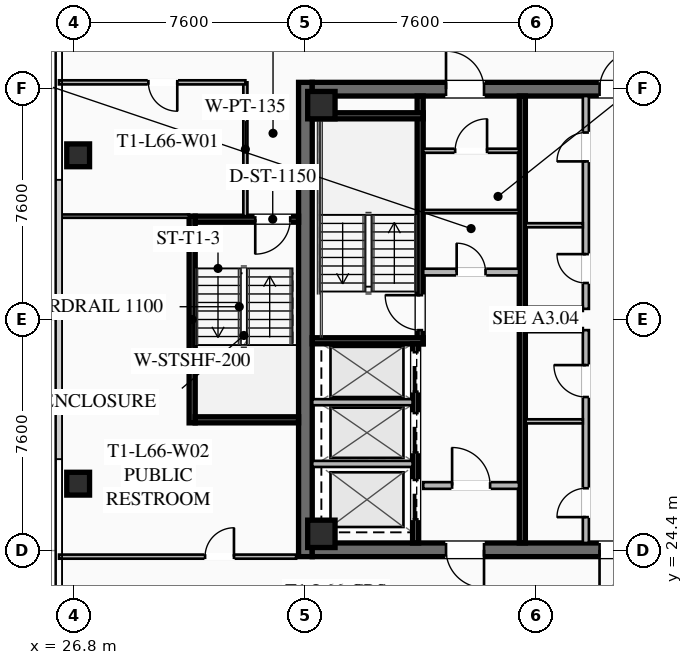
"""IFC4 building model, lengths in metres.
Left out: names, types, materials, properties, quantities, classifications, styles, units other than length and angle.
Written with IfcOpenShell. Run it as: python <this file> out.ifc"""

import sys

from ifc_helpers import new_model, si_unit, direction, frame, frame_2d, origin, origin_2d, place, context, subcontext, project, spatial, rectangle, hollow_rectangle, extrude, element, fill, save


model = new_model("IFC4")
c1 = context("Model", 3, precision=1e-05, world=origin(), true_north=direction((0.0, 1.0)))
c2 = subcontext(c1, "Body", "Model", "MODEL_VIEW")
j1 = project(units=[si_unit("LENGTHUNIT", "METRE"), si_unit("PLANEANGLEUNIT", "RADIAN")], contexts=[c1])
p1 = place(None, origin())
s1 = spatial("IfcSite", under=j1, at=p1, CompositionType="ELEMENT")
p2 = place(p1, origin())
s2 = spatial("IfcBuilding", under=s1, at=p2, CompositionType="ELEMENT")
p3 = place(p2, frame((0.0, 0.0, 243.25)))
s3 = spatial("IfcBuildingStorey", under=s2, at=p3, CompositionType="ELEMENT", Elevation=243.25)
p4 = place(p3, frame((34.425, 24.2, 0.0), z_axis=(0.0, 0.0, 1.0), x_axis=(0.0, 1.0, 0.0)))
e1 = element("IfcWall", 1, at=p4, inside=s3, PredefinedType="SHEAR", context=c2, shape_type="SweptSolid", body=[
    extrude(rectangle(XDim=15.6, YDim=0.45, at=frame_2d((7.8, 0.0))), origin(), (0.0, 0.0, 1.0), 3.55),
])
p5 = place(p3, frame((49.35, 24.425, 0.0), z_axis=(0.0, 0.0, 1.0), x_axis=(-1.0, 0.0, 0.0)))
e2 = element("IfcWall", 2, at=p5, inside=s3, PredefinedType="SHEAR", context=c2, shape_type="SweptSolid", body=[
    extrude(rectangle(XDim=14.7, YDim=0.45, at=frame_2d((7.35, 0.0))), origin(), (0.0, 0.0, 1.0), 3.55),
])
p6 = place(p5, frame((9.05, 0.0, 0.0)))
e3 = element("IfcOpeningElement", 3, at=p6, cuts=e2, PredefinedType="OPENING", context=c2, shape_type="SweptSolid", body=[
    extrude(rectangle(XDim=1.25, YDim=2.25, at=frame_2d((0.625, 1.125))), frame((0.0, 0.235, 0.0), z_axis=(0.0, -1.0, 0.0), x_axis=(1.0, 0.0, 0.0)), (0.0, 0.0, 1.0), 0.47),
])
p7 = place(p5, frame((4.0, 0.0, 0.0)))
e4 = element("IfcOpeningElement", 4, at=p7, cuts=e2, PredefinedType="OPENING", context=c2, shape_type="SweptSolid", body=[
    extrude(rectangle(XDim=1.25, YDim=2.25, at=frame_2d((0.625, 1.125))), frame((0.0, 0.235, 0.0), z_axis=(0.0, -1.0, 0.0), x_axis=(1.0, 0.0, 0.0)), (0.0, 0.0, 1.0), 0.47),
])
p8 = place(p3, frame((34.65, 39.575, 0.0), z_axis=(0.0, 0.0, 1.0), x_axis=(1.0, 0.0, 0.0)))
e5 = element("IfcWall", 5, at=p8, inside=s3, PredefinedType="SHEAR", context=c2, shape_type="SweptSolid", body=[
    extrude(rectangle(XDim=14.7, YDim=0.45, at=frame_2d((7.35, 0.0))), origin(), (0.0, 0.0, 1.0), 3.55),
])
p9 = place(p8, frame((4.4, 0.0, 0.0)))
e6 = element("IfcOpeningElement", 6, at=p9, cuts=e5, PredefinedType="OPENING", context=c2, shape_type="SweptSolid", body=[
    extrude(rectangle(XDim=1.25, YDim=2.25, at=frame_2d((0.625, 1.125))), frame((0.0, 0.235, 0.0), z_axis=(0.0, -1.0, 0.0), x_axis=(1.0, 0.0, 0.0)), (0.0, 0.0, 1.0), 0.47),
])
p10 = place(p8, frame((9.45, 0.0, 0.0)))
e7 = element("IfcOpeningElement", 7, at=p10, cuts=e5, PredefinedType="OPENING", context=c2, shape_type="SweptSolid", body=[
    extrude(rectangle(XDim=1.25, YDim=2.25, at=frame_2d((0.625, 1.125))), frame((0.0, 0.235, 0.0), z_axis=(0.0, -1.0, 0.0), x_axis=(1.0, 0.0, 0.0)), (0.0, 0.0, 1.0), 0.47),
])
for number, where, z_axis, x_axis in (
    (8, (34.95, 24.95, 0.0), (0.0, 0.0, 1.0), (1.0, 0.0, 0.0)),
    (9, (34.95, 39.05, 0.0), (0.0, 0.0, 1.0), (1.0, 0.0, 0.0)),
):
    element("IfcColumn", number, at=place(p3, frame(where, z_axis=z_axis, x_axis=x_axis)), inside=s3, PredefinedType="COLUMN", context=c2, shape_type="SweptSolid", body=[
        extrude(hollow_rectangle(XDim=0.9, YDim=0.9, WallThickness=0.04, at=origin_2d()), origin(), (0.0, 0.0, 1.0), 3.25),
    ])
for number, where, z_axis, x_axis in (
    (10, (26.95, 37.4, 0.0), (0.0, 0.0, 1.0), (1.0, 0.0, 0.0)),
    (11, (26.95, 26.6, 0.0), (0.0, 0.0, 1.0), (1.0, 0.0, 0.0)),
):
    element("IfcColumn", number, at=place(p3, frame(where, z_axis=z_axis, x_axis=x_axis)), inside=s3, PredefinedType="COLUMN", context=c2, shape_type="SweptSolid", body=[
        extrude(hollow_rectangle(XDim=0.75, YDim=0.75, WallThickness=0.032, at=origin_2d()), origin(), (0.0, 0.0, 1.0), 3.25),
    ])
p11 = place(p3, frame((38.2, 31.2, 0.0), z_axis=(0.0, 0.0, 1.0), x_axis=(0.0, 1.0, 0.0)))
e12 = element("IfcWall", 12, at=p11, inside=s3, PredefinedType="SHEAR", context=c2, shape_type="SweptSolid", body=[
    extrude(rectangle(XDim=8.15, YDim=0.2, at=frame_2d((4.075, 0.0))), origin(), (0.0, 0.0, 1.0), 3.25),
])
p12 = place(p11, frame((0.45, 0.0, 0.0)))
e13 = element("IfcOpeningElement", 13, at=p12, cuts=e12, PredefinedType="OPENING", context=c2, shape_type="SweptSolid", body=[
    extrude(rectangle(XDim=1.15, YDim=2.2, at=frame_2d((0.575, 1.1))), frame((0.0, 0.11, 0.0), z_axis=(0.0, -1.0, 0.0), x_axis=(1.0, 0.0, 0.0)), (0.0, 0.0, 1.0), 0.22),
])
for number, where, z_axis, x_axis in (
    (14, (34.65, 31.3, 0.0), (0.0, 0.0, 1.0), (1.0, 0.0, 0.0)),
    (15, (34.65, 38.7, 0.0), (0.0, 0.0, 1.0), (1.0, 0.0, 0.0)),
):
    element("IfcWall", number, at=place(p3, frame(where, z_axis=z_axis, x_axis=x_axis)), inside=s3, PredefinedType="SHEAR", context=c2, shape_type="SweptSolid", body=[
        extrude(rectangle(XDim=3.65, YDim=0.2, at=frame_2d((1.825, 0.0))), origin(), (0.0, 0.0, 1.0), 3.25),
    ])
p13 = place(p3, frame((41.56, 24.65, 0.0), z_axis=(0.0, 0.0, 1.0), x_axis=(0.0, 1.0, 0.0)))
e16 = element("IfcWall", 16, at=p13, inside=s3, PredefinedType="SHEAR", context=c2, shape_type="SweptSolid", body=[
    extrude(rectangle(XDim=14.7, YDim=0.2, at=frame_2d((7.35, 0.0))), origin(), (0.0, 0.0, 1.0), 3.25),
])
p14 = place(p3, frame((38.3, 33.56, 0.0), z_axis=(0.0, 0.0, 1.0), x_axis=(1.0, 0.0, 0.0)))
e17 = element("IfcWall", 17, at=p14, inside=s3, PredefinedType="SOLIDWALL", context=c2, shape_type="SweptSolid", body=[
    extrude(rectangle(XDim=3.15, YDim=0.22, at=frame_2d((1.575, 0.0))), origin(), (0.0, 0.0, 1.0), 2.393),
])
p15 = place(p14, frame((1.1, 0.0, 0.0)))
e18 = element("IfcOpeningElement", 18, at=p15, cuts=e17, PredefinedType="OPENING", context=c2, shape_type="SweptSolid", body=[
    extrude(rectangle(XDim=0.95, YDim=2.05, at=frame_2d((0.475, 1.025))), frame((0.0, 0.12, 0.0), z_axis=(0.0, -1.0, 0.0), x_axis=(1.0, 0.0, 0.0)), (0.0, 0.0, 1.0), 0.24),
])
p16 = place(p3, frame((38.3, 26.54, 0.0), z_axis=(0.0, 0.0, 1.0), x_axis=(1.0, 0.0, 0.0)))
e19 = element("IfcWall", 19, at=p16, inside=s3, PredefinedType="SOLIDWALL", context=c2, shape_type="SweptSolid", body=[
    extrude(rectangle(XDim=3.15, YDim=0.22, at=frame_2d((1.575, 0.0))), origin(), (0.0, 0.0, 1.0), 2.393),
])
p17 = place(p16, frame((0.95, 0.0, 0.0)))
e20 = element("IfcOpeningElement", 20, at=p17, cuts=e19, PredefinedType="OPENING", context=c2, shape_type="SweptSolid", body=[
    extrude(rectangle(XDim=1.25, YDim=2.25, at=frame_2d((0.625, 1.125))), frame((0.0, 0.12, 0.0), z_axis=(0.0, -1.0, 0.0), x_axis=(1.0, 0.0, 0.0)), (0.0, 0.0, 1.0), 0.24),
])
p18 = place(p3, frame((38.05, 24.65, 0.0), z_axis=(0.0, 0.0, 1.0), x_axis=(0.0, 1.0, 0.0)))
e21 = element("IfcWall", 21, at=p18, inside=s3, PredefinedType="SHEAR", context=c2, shape_type="SweptSolid", body=[
    extrude(rectangle(XDim=6.55, YDim=0.2, at=frame_2d((3.275, 0.0))), origin(), (0.0, 0.0, 1.0), 3.25),
])
p19 = place(p18, frame((4.975, 0.0, 0.0)))
e22 = element("IfcOpeningElement", 22, at=p19, cuts=e21, PredefinedType="OPENING", context=c2, shape_type="SweptSolid", body=[
    extrude(rectangle(XDim=1.3, YDim=2.25, at=frame_2d((0.65, 1.125))), frame((0.0, 0.11, 0.0), z_axis=(0.0, -1.0, 0.0), x_axis=(1.0, 0.0, 0.0)), (0.0, 0.0, 1.0), 0.22),
])
p20 = place(p18, frame((2.975, 0.0, 0.0)))
e23 = element("IfcOpeningElement", 23, at=p20, cuts=e21, PredefinedType="OPENING", context=c2, shape_type="SweptSolid", body=[
    extrude(rectangle(XDim=1.3, YDim=2.25, at=frame_2d((0.65, 1.125))), frame((0.0, 0.11, 0.0), z_axis=(0.0, -1.0, 0.0), x_axis=(1.0, 0.0, 0.0)), (0.0, 0.0, 1.0), 0.22),
])
p21 = place(p18, frame((0.775, 0.0, 0.0)))
e24 = element("IfcOpeningElement", 24, at=p21, cuts=e21, PredefinedType="OPENING", context=c2, shape_type="SweptSolid", body=[
    extrude(rectangle(XDim=1.3, YDim=2.25, at=frame_2d((0.65, 1.125))), frame((0.0, 0.11, 0.0), z_axis=(0.0, -1.0, 0.0), x_axis=(1.0, 0.0, 0.0)), (0.0, 0.0, 1.0), 0.22),
])
for number, where, z_axis, x_axis in (
    (25, (34.65, 27.25, 0.0), (0.0, 0.0, 1.0), (1.0, 0.0, 0.0)),
    (26, (34.65, 29.28, 0.0), (0.0, 0.0, 1.0), (1.0, 0.0, 0.0)),
):
    element("IfcWall", number, at=place(p3, frame(where, z_axis=z_axis, x_axis=x_axis)), inside=s3, PredefinedType="SOLIDWALL", context=c2, shape_type="SweptSolid", body=[
        extrude(rectangle(XDim=3.3, YDim=0.2, at=frame_2d((1.65, 0.0))), origin(), (0.0, 0.0, 1.0), 3.25),
    ])
p22 = place(p3, frame((38.3, 37.55, 0.0), z_axis=(0.0, 0.0, 1.0), x_axis=(1.0, 0.0, 0.0)))
e27 = element("IfcWall", 27, at=p22, inside=s3, PredefinedType="PARTITIONING", context=c2, shape_type="SweptSolid", body=[
    extrude(rectangle(XDim=3.15, YDim=0.135, at=frame_2d((1.575, 0.0))), origin(), (0.0, 0.0, 1.0), 2.393),
])
p23 = place(p22, frame((1.05, 0.0, 0.0)))
e28 = element("IfcOpeningElement", 28, at=p23, cuts=e27, PredefinedType="OPENING", context=c2, shape_type="SweptSolid", body=[
    extrude(rectangle(XDim=1.05, YDim=2.2, at=frame_2d((0.525, 1.1))), frame((0.0, 0.077, 0.0), z_axis=(0.0, -1.0, 0.0), x_axis=(1.0, 0.0, 0.0)), (0.0, 0.0, 1.0), 0.155),
])
p24 = place(p3, frame((38.3, 35.55, 0.0), z_axis=(0.0, 0.0, 1.0), x_axis=(1.0, 0.0, 0.0)))
e29 = element("IfcWall", 29, at=p24, inside=s3, PredefinedType="PARTITIONING", context=c2, shape_type="SweptSolid", body=[
    extrude(rectangle(XDim=3.15, YDim=0.11, at=frame_2d((1.575, 0.0))), origin(), (0.0, 0.0, 1.0), 2.393),
])
p25 = place(p3, frame((43.65, 24.65, 0.0), z_axis=(0.0, 0.0, 1.0), x_axis=(0.0, 1.0, 0.0)))
e30 = element("IfcWall", 30, at=p25, inside=s3, PredefinedType="SOLIDWALL", context=c2, shape_type="SweptSolid", body=[
    extrude(rectangle(XDim=7.0, YDim=0.2, at=frame_2d((3.5, 0.0))), origin(), (0.0, 0.0, 1.0), 2.393),
])
p26 = place(p25, frame((0.85, 0.0, 0.0)))
e31 = element("IfcOpeningElement", 31, at=p26, cuts=e30, PredefinedType="OPENING", context=c2, shape_type="SweptSolid", body=[
    extrude(rectangle(XDim=0.95, YDim=2.05, at=frame_2d((0.475, 1.025))), frame((0.0, 0.11, 0.0), z_axis=(0.0, -1.0, 0.0), x_axis=(1.0, 0.0, 0.0)), (0.0, 0.0, 1.0), 0.22),
])
p27 = place(p25, frame((4.8, 0.0, 0.0)))
e32 = element("IfcOpeningElement", 32, at=p27, cuts=e30, PredefinedType="OPENING", context=c2, shape_type="SweptSolid", body=[
    extrude(rectangle(XDim=1.05, YDim=2.2, at=frame_2d((0.525, 1.1))), frame((0.0, 0.11, 0.0), z_axis=(0.0, -1.0, 0.0), x_axis=(1.0, 0.0, 0.0)), (0.0, 0.0, 1.0), 0.22),
])
for number, where, z_axis, x_axis in (
    (33, (41.67, 31.65, 0.0), (0.0, 0.0, 1.0), (1.0, 0.0, 0.0)),
    (34, (41.67, 28.65, 0.0), (0.0, 0.0, 1.0), (1.0, 0.0, 0.0)),
):
    element("IfcWall", number, at=place(p3, frame(where, z_axis=z_axis, x_axis=x_axis)), inside=s3, PredefinedType="PARTITIONING", context=c2, shape_type="SweptSolid", body=[
        extrude(rectangle(XDim=1.88, YDim=0.135, at=frame_2d((0.94, 0.0))), origin(), (0.0, 0.0, 1.0), 2.393),
    ])
p28 = place(p3, frame((43.65, 32.35, 0.0), z_axis=(0.0, 0.0, 1.0), x_axis=(0.0, 1.0, 0.0)))
e35 = element("IfcWall", 35, at=p28, inside=s3, PredefinedType="SOLIDWALL", context=c2, shape_type="SweptSolid", body=[
    extrude(rectangle(XDim=7.0, YDim=0.2, at=frame_2d((3.5, 0.0))), origin(), (0.0, 0.0, 1.0), 2.393),
])
p29 = place(p28, frame((0.85, 0.0, 0.0)))
e36 = element("IfcOpeningElement", 36, at=p29, cuts=e35, PredefinedType="OPENING", context=c2, shape_type="SweptSolid", body=[
    extrude(rectangle(XDim=0.95, YDim=2.05, at=frame_2d((0.475, 1.025))), frame((0.0, 0.11, 0.0), z_axis=(0.0, -1.0, 0.0), x_axis=(1.0, 0.0, 0.0)), (0.0, 0.0, 1.0), 0.22),
])
p30 = place(p28, frame((4.85, 0.0, 0.0)))
e37 = element("IfcOpeningElement", 37, at=p30, cuts=e35, PredefinedType="OPENING", context=c2, shape_type="SweptSolid", body=[
    extrude(rectangle(XDim=0.95, YDim=2.05, at=frame_2d((0.475, 1.025))), frame((0.0, 0.11, 0.0), z_axis=(0.0, -1.0, 0.0), x_axis=(1.0, 0.0, 0.0)), (0.0, 0.0, 1.0), 0.22),
])
for number, where, z_axis, x_axis in (
    (38, (41.67, 32.35, 0.0), (0.0, 0.0, 1.0), (1.0, 0.0, 0.0)),
    (39, (41.67, 35.1, 0.0), (0.0, 0.0, 1.0), (1.0, 0.0, 0.0)),
):
    element("IfcWall", number, at=place(p3, frame(where, z_axis=z_axis, x_axis=x_axis)), inside=s3, PredefinedType="PARTITIONING", context=c2, shape_type="SweptSolid", body=[
        extrude(rectangle(XDim=1.88, YDim=0.135, at=frame_2d((0.94, 0.0))), origin(), (0.0, 0.0, 1.0), 2.393),
    ])
p31 = place(p3, frame((30.7, 28.6, 0.0), z_axis=(0.0, 0.0, 1.0), x_axis=(0.0, 1.0, 0.0)))
e40 = element("IfcWall", 40, at=p31, inside=s3, PredefinedType="SHEAR", context=c2, shape_type="SweptSolid", body=[
    extrude(rectangle(XDim=6.8, YDim=0.2, at=frame_2d((3.4, 0.0))), origin(), (0.0, 0.0, 1.0), 3.25),
])
p32 = place(p3, frame((34.2, 35.3, 0.0), z_axis=(0.0, 0.0, 1.0), x_axis=(-1.0, 0.0, 0.0)))
e41 = element("IfcWall", 41, at=p32, inside=s3, PredefinedType="SHEAR", context=c2, shape_type="SweptSolid", body=[
    extrude(rectangle(XDim=3.4, YDim=0.2, at=frame_2d((1.7, 0.0))), origin(), (0.0, 0.0, 1.0), 3.25),
])
p33 = place(p32, frame((0.275, 0.0, 0.0)))
e42 = element("IfcOpeningElement", 42, at=p33, cuts=e41, PredefinedType="OPENING", context=c2, shape_type="SweptSolid", body=[
    extrude(rectangle(XDim=1.15, YDim=2.2, at=frame_2d((0.575, 1.1))), frame((0.0, 0.11, 0.0), z_axis=(0.0, -1.0, 0.0), x_axis=(1.0, 0.0, 0.0)), (0.0, 0.0, 1.0), 0.22),
])
p34 = place(p3, frame((30.8, 28.7, 0.0), z_axis=(0.0, 0.0, 1.0), x_axis=(1.0, 0.0, 0.0)))
e43 = element("IfcWall", 43, at=p34, inside=s3, PredefinedType="SHEAR", context=c2, shape_type="SweptSolid", body=[
    extrude(rectangle(XDim=3.4, YDim=0.2, at=frame_2d((1.7, 0.0))), origin(), (0.0, 0.0, 1.0), 3.25),
])
p35 = place(p3, frame((32.45, 35.4, 0.0), z_axis=(0.0, 0.0, 1.0), x_axis=(0.0, 1.0, 0.0)))
e44 = element("IfcWall", 44, at=p35, inside=s3, PredefinedType="PARTITIONING", context=c2, shape_type="SweptSolid", body=[
    extrude(rectangle(XDim=4.4, YDim=0.135, at=frame_2d((2.2, 0.0))), origin(), (0.0, 0.0, 1.0), 2.393),
])
p36 = place(p3, frame((32.45, 39.8, 0.0), z_axis=(0.0, 0.0, 1.0), x_axis=(-1.0, 0.0, 0.0)))
e45 = element("IfcWall", 45, at=p36, inside=s3, PredefinedType="PARTITIONING", context=c2, shape_type="SweptSolid", body=[
    extrude(rectangle(XDim=6.13, YDim=0.135, at=frame_2d((3.065, 0.0))), origin(), (0.0, 0.0, 1.0), 2.393),
])
p37 = place(p36, frame((2.24, 0.0, 0.0)))
e46 = element("IfcOpeningElement", 46, at=p37, cuts=e45, PredefinedType="OPENING", context=c2, shape_type="SweptSolid", body=[
    extrude(rectangle(XDim=0.95, YDim=2.05, at=frame_2d((0.475, 1.025))), frame((0.0, 0.077, 0.0), z_axis=(0.0, -1.0, 0.0), x_axis=(1.0, 0.0, 0.0)), (0.0, 0.0, 1.0), 0.155),
])
p38 = place(p3, frame((26.32, 24.2, 0.0), z_axis=(0.0, 0.0, 1.0), x_axis=(1.0, 0.0, 0.0)))
e47 = element("IfcWall", 47, at=p38, inside=s3, PredefinedType="PARTITIONING", context=c2, shape_type="SweptSolid", body=[
    extrude(rectangle(XDim=7.8, YDim=0.135, at=frame_2d((3.9, 0.0))), origin(), (0.0, 0.0, 1.0), 2.393),
])
p39 = place(p38, frame((4.805, 0.0, 0.0)))
e48 = element("IfcOpeningElement", 48, at=p39, cuts=e47, PredefinedType="OPENING", context=c2, shape_type="SweptSolid", body=[
    extrude(rectangle(XDim=0.95, YDim=2.05, at=frame_2d((0.475, 1.025))), frame((0.0, 0.077, 0.0), z_axis=(0.0, -1.0, 0.0), x_axis=(1.0, 0.0, 0.0)), (0.0, 0.0, 1.0), 0.155),
])
p40 = place(p3, frame((30.6, 35.4, 0.0), z_axis=(0.0, 0.0, 1.0), x_axis=(-1.0, 0.0, 0.0)))
e49 = element("IfcWall", 49, at=p40, inside=s3, PredefinedType="PARTITIONING", context=c2, shape_type="SweptSolid", body=[
    extrude(rectangle(XDim=4.28, YDim=0.11, at=frame_2d((2.14, 0.0))), origin(), (0.0, 0.0, 1.0), 2.393),
])
p41 = place(p9, origin())
e50 = element("IfcDoor", 50, at=p41, inside=s3, OperationType="SINGLE_SWING_LEFT", PredefinedType="DOOR", context=c2, shape_type="SweptSolid", body=[
    extrude(rectangle(XDim=1.25, YDim=2.25, at=frame_2d((0.625, 1.125))), frame((0.0, 0.025, 0.0), z_axis=(0.0, -1.0, 0.0), x_axis=(1.0, 0.0, 0.0)), (0.0, 0.0, 1.0), 0.05),
])
fill(e6, e50)
p42 = place(p10, origin())
e51 = element("IfcDoor", 51, at=p42, inside=s3, OperationType="SINGLE_SWING_RIGHT", PredefinedType="DOOR", context=c2, shape_type="SweptSolid", body=[
    extrude(rectangle(XDim=1.25, YDim=2.25, at=frame_2d((0.625, 1.125))), frame((0.0, 0.025, 0.0), z_axis=(0.0, -1.0, 0.0), x_axis=(1.0, 0.0, 0.0)), (0.0, 0.0, 1.0), 0.05),
])
fill(e7, e51)
p43 = place(p6, origin())
e52 = element("IfcDoor", 52, at=p43, inside=s3, OperationType="SINGLE_SWING_LEFT", PredefinedType="DOOR", context=c2, shape_type="SweptSolid", body=[
    extrude(rectangle(XDim=1.25, YDim=2.25, at=frame_2d((0.625, 1.125))), frame((0.0, 0.025, 0.0), z_axis=(0.0, -1.0, 0.0), x_axis=(1.0, 0.0, 0.0)), (0.0, 0.0, 1.0), 0.05),
])
fill(e3, e52)
p44 = place(p7, origin())
e53 = element("IfcDoor", 53, at=p44, inside=s3, OperationType="SINGLE_SWING_RIGHT", PredefinedType="DOOR", context=c2, shape_type="SweptSolid", body=[
    extrude(rectangle(XDim=1.25, YDim=2.25, at=frame_2d((0.625, 1.125))), frame((0.0, 0.025, 0.0), z_axis=(0.0, -1.0, 0.0), x_axis=(1.0, 0.0, 0.0)), (0.0, 0.0, 1.0), 0.05),
])
fill(e4, e53)
p45 = place(p12, origin())
e54 = element("IfcDoor", 54, at=p45, inside=s3, OperationType="SINGLE_SWING_RIGHT", PredefinedType="DOOR", context=c2, shape_type="SweptSolid", body=[
    extrude(rectangle(XDim=1.15, YDim=2.2, at=frame_2d((0.575, 1.1))), frame((0.0, 0.025, 0.0), z_axis=(0.0, -1.0, 0.0), x_axis=(1.0, 0.0, 0.0)), (0.0, 0.0, 1.0), 0.05),
])
fill(e13, e54)
p46 = place(p17, origin())
e55 = element("IfcDoor", 55, at=p46, inside=s3, OperationType="SINGLE_SWING_LEFT", PredefinedType="DOOR", context=c2, shape_type="SweptSolid", body=[
    extrude(rectangle(XDim=1.25, YDim=2.25, at=frame_2d((0.625, 1.125))), frame((0.0, 0.025, 0.0), z_axis=(0.0, -1.0, 0.0), x_axis=(1.0, 0.0, 0.0)), (0.0, 0.0, 1.0), 0.05),
])
fill(e20, e55)
p47 = place(p23, origin())
e56 = element("IfcDoor", 56, at=p47, inside=s3, OperationType="SINGLE_SWING_RIGHT", PredefinedType="DOOR", context=c2, shape_type="SweptSolid", body=[
    extrude(rectangle(XDim=1.05, YDim=2.2, at=frame_2d((0.525, 1.1))), frame((0.0, 0.025, 0.0), z_axis=(0.0, -1.0, 0.0), x_axis=(1.0, 0.0, 0.0)), (0.0, 0.0, 1.0), 0.05),
])
fill(e28, e56)
p48 = place(p15, origin())
e57 = element("IfcDoor", 57, at=p48, inside=s3, OperationType="SINGLE_SWING_LEFT", PredefinedType="DOOR", context=c2, shape_type="SweptSolid", body=[
    extrude(rectangle(XDim=0.95, YDim=2.05, at=frame_2d((0.475, 1.025))), frame((0.0, 0.025, 0.0), z_axis=(0.0, -1.0, 0.0), x_axis=(1.0, 0.0, 0.0)), (0.0, 0.0, 1.0), 0.05),
])
fill(e18, e57)
p49 = place(p26, origin())
e58 = element("IfcDoor", 58, at=p49, inside=s3, OperationType="SINGLE_SWING_LEFT", PredefinedType="DOOR", context=c2, shape_type="SweptSolid", body=[
    extrude(rectangle(XDim=0.95, YDim=2.05, at=frame_2d((0.475, 1.025))), frame((0.0, 0.025, 0.0), z_axis=(0.0, -1.0, 0.0), x_axis=(1.0, 0.0, 0.0)), (0.0, 0.0, 1.0), 0.05),
])
fill(e31, e58)
p50 = place(p27, origin())
e59 = element("IfcDoor", 59, at=p50, inside=s3, OperationType="SINGLE_SWING_RIGHT", PredefinedType="DOOR", context=c2, shape_type="SweptSolid", body=[
    extrude(rectangle(XDim=1.05, YDim=2.2, at=frame_2d((0.525, 1.1))), frame((0.0, 0.025, 0.0), z_axis=(0.0, -1.0, 0.0), x_axis=(1.0, 0.0, 0.0)), (0.0, 0.0, 1.0), 0.05),
])
fill(e32, e59)
p51 = place(p29, origin())
e60 = element("IfcDoor", 60, at=p51, inside=s3, OperationType="SINGLE_SWING_RIGHT", PredefinedType="DOOR", context=c2, shape_type="SweptSolid", body=[
    extrude(rectangle(XDim=0.95, YDim=2.05, at=frame_2d((0.475, 1.025))), frame((0.0, 0.025, 0.0), z_axis=(0.0, -1.0, 0.0), x_axis=(1.0, 0.0, 0.0)), (0.0, 0.0, 1.0), 0.05),
])
fill(e36, e60)
p52 = place(p30, origin())
e61 = element("IfcDoor", 61, at=p52, inside=s3, OperationType="SINGLE_SWING_LEFT", PredefinedType="DOOR", context=c2, shape_type="SweptSolid", body=[
    extrude(rectangle(XDim=0.95, YDim=2.05, at=frame_2d((0.475, 1.025))), frame((0.0, 0.025, 0.0), z_axis=(0.0, -1.0, 0.0), x_axis=(1.0, 0.0, 0.0)), (0.0, 0.0, 1.0), 0.05),
])
fill(e37, e61)
p53 = place(p33, origin())
e62 = element("IfcDoor", 62, at=p53, inside=s3, OperationType="SINGLE_SWING_RIGHT", PredefinedType="DOOR", context=c2, shape_type="SweptSolid", body=[
    extrude(rectangle(XDim=1.15, YDim=2.2, at=frame_2d((0.575, 1.1))), frame((0.0, 0.025, 0.0), z_axis=(0.0, -1.0, 0.0), x_axis=(1.0, 0.0, 0.0)), (0.0, 0.0, 1.0), 0.05),
])
fill(e42, e62)
p54 = place(p37, origin())
e63 = element("IfcDoor", 63, at=p54, inside=s3, OperationType="SINGLE_SWING_LEFT", PredefinedType="DOOR", context=c2, shape_type="SweptSolid", body=[
    extrude(rectangle(XDim=0.95, YDim=2.05, at=frame_2d((0.475, 1.025))), frame((0.0, 0.025, 0.0), z_axis=(0.0, -1.0, 0.0), x_axis=(1.0, 0.0, 0.0)), (0.0, 0.0, 1.0), 0.05),
])
fill(e46, e63)
p55 = place(p39, origin())
e64 = element("IfcDoor", 64, at=p55, inside=s3, OperationType="SINGLE_SWING_RIGHT", PredefinedType="DOOR", context=c2, shape_type="SweptSolid", body=[
    extrude(rectangle(XDim=0.95, YDim=2.05, at=frame_2d((0.475, 1.025))), frame((0.0, 0.025, 0.0), z_axis=(0.0, -1.0, 0.0), x_axis=(1.0, 0.0, 0.0)), (0.0, 0.0, 1.0), 0.05),
])
fill(e48, e64)
p56 = place(p19, origin())
e65 = element("IfcDoor", 65, at=p56, inside=s3, OperationType="SLIDING_TO_LEFT", PredefinedType="DOOR", context=c2, shape_type="SweptSolid", body=[
    extrude(rectangle(XDim=1.3, YDim=2.25, at=frame_2d((0.65, 1.125))), frame((0.0, 0.025, 0.0), z_axis=(0.0, -1.0, 0.0), x_axis=(1.0, 0.0, 0.0)), (0.0, 0.0, 1.0), 0.05),
])
fill(e22, e65)
p57 = place(p20, origin())
e66 = element("IfcDoor", 66, at=p57, inside=s3, OperationType="SLIDING_TO_LEFT", PredefinedType="DOOR", context=c2, shape_type="SweptSolid", body=[
    extrude(rectangle(XDim=1.3, YDim=2.25, at=frame_2d((0.65, 1.125))), frame((0.0, 0.025, 0.0), z_axis=(0.0, -1.0, 0.0), x_axis=(1.0, 0.0, 0.0)), (0.0, 0.0, 1.0), 0.05),
])
fill(e23, e66)
p58 = place(p21, origin())
e67 = element("IfcDoor", 67, at=p58, inside=s3, OperationType="SLIDING_TO_LEFT", PredefinedType="DOOR", context=c2, shape_type="SweptSolid", body=[
    extrude(rectangle(XDim=1.3, YDim=2.25, at=frame_2d((0.65, 1.125))), frame((0.0, 0.025, 0.0), z_axis=(0.0, -1.0, 0.0), x_axis=(1.0, 0.0, 0.0)), (0.0, 0.0, 1.0), 0.05),
])
fill(e24, e67)
save(model, sys.argv[1])
